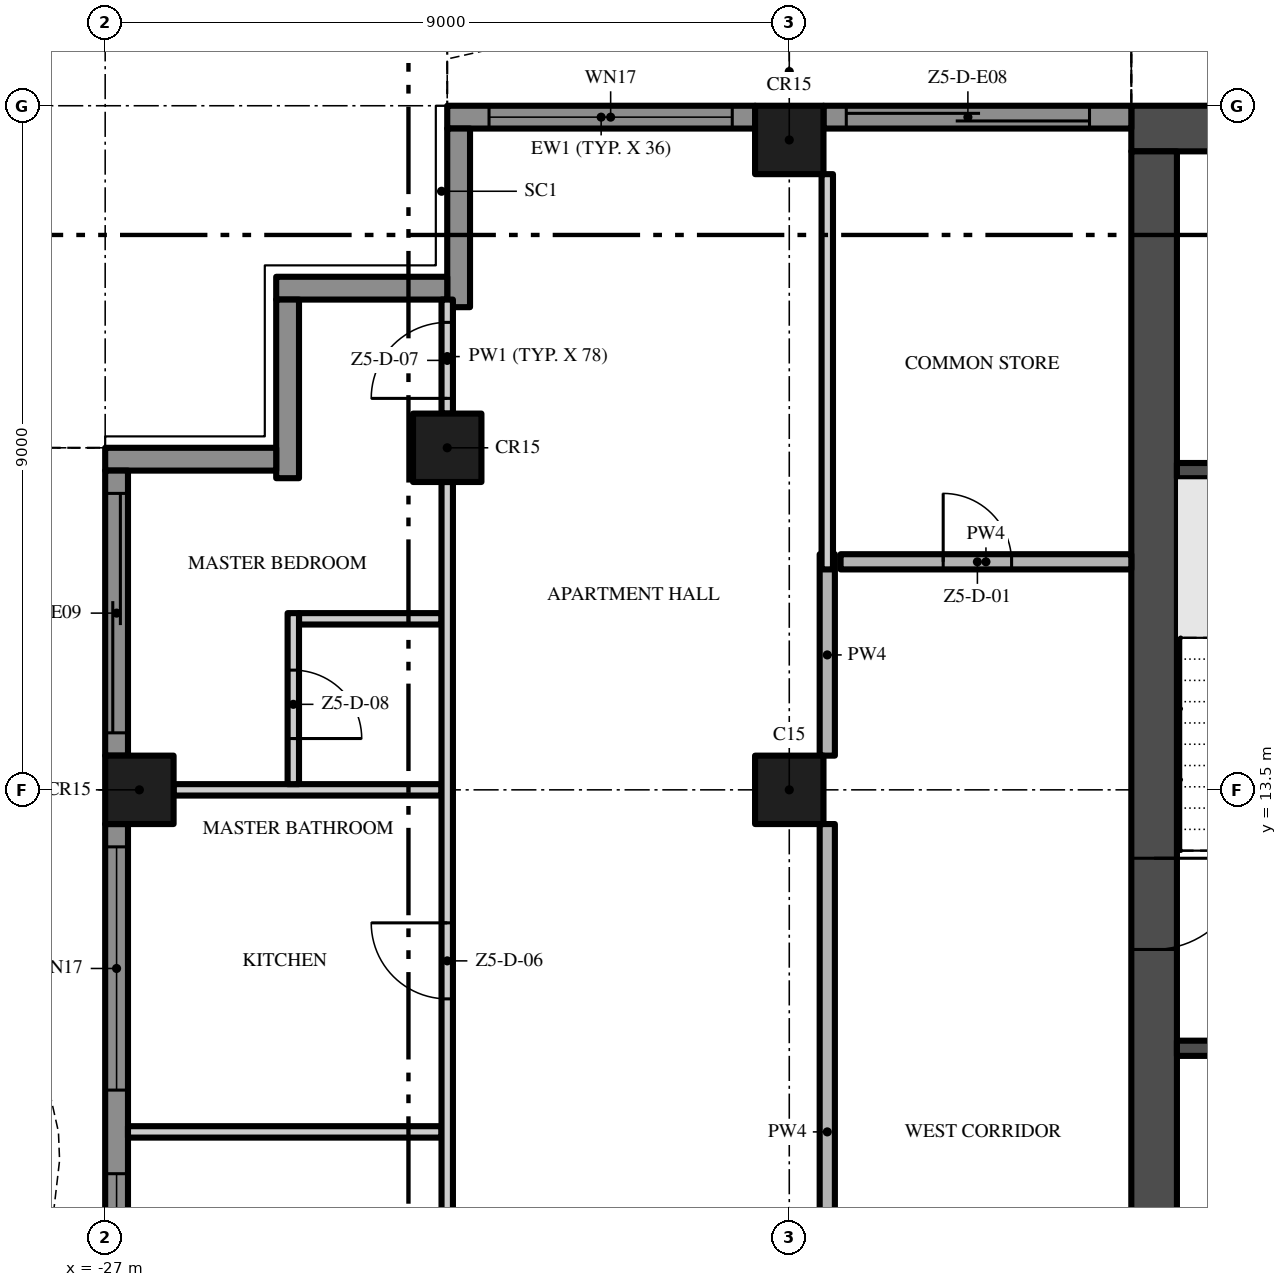
"""IFC4 building model, lengths in metres.
Left out: names, types, materials, properties, quantities, classifications, styles, units other than length and angle.
Written with IfcOpenShell. Run it as: python <this file> out.ifc"""

import sys

from ifc_helpers import new_model, si_unit, direction, frame, frame_2d, origin, origin_2d, place, context, subcontext, project, spatial, polyline, rectangle, outline, extrude, element, fill, save


model = new_model("IFC4")
c1 = context("Model", 3, precision=1e-05, world=origin(), true_north=direction((0.0, 1.0)))
c2 = subcontext(c1, "Body", "Model", "MODEL_VIEW")
j1 = project(units=[si_unit("LENGTHUNIT", "METRE"), si_unit("PLANEANGLEUNIT", "RADIAN")], contexts=[c1])
p1 = place(None, origin())
s1 = spatial("IfcSite", under=j1, at=p1, CompositionType="ELEMENT")
p2 = place(p1, origin())
s2 = spatial("IfcBuilding", under=s1, at=p2, CompositionType="ELEMENT")
p3 = place(p2, frame((0.0, 0.0, 276.8)))
s3 = spatial("IfcBuildingStorey", under=s2, at=p3, CompositionType="ELEMENT", Elevation=276.8)
p4 = place(p3, frame((13.5, 22.2, -0.3), z_axis=(0.0, 0.0, 1.0), x_axis=(-1.0, 0.0, 0.0)))
e1 = element("IfcWall", 1, at=p4, inside=s3, PredefinedType="SHEAR", context=c2, shape_type="SweptSolid", body=[
    extrude(rectangle(XDim=27.0, YDim=0.6, at=frame_2d((13.5, 0.0))), origin(), (0.0, 0.0, 1.0), 3.8),
])
p5 = place(p3, frame((-13.2, 21.9, -0.3), z_axis=(0.0, 0.0, 1.0), x_axis=(0.0, -1.0, 0.0)))
e2 = element("IfcWall", 2, at=p5, inside=s3, PredefinedType="SHEAR", context=c2, shape_type="SweptSolid", body=[
    extrude(rectangle(XDim=16.8, YDim=0.6, at=frame_2d((8.4, 0.0))), origin(), (0.0, 0.0, 1.0), 3.8),
])
p6 = place(p5, frame((9.3, 0.0, 0.3)))
e3 = element("IfcOpeningElement", 3, at=p6, cuts=e2, PredefinedType="OPENING", context=c2, shape_type="SweptSolid", body=[
    extrude(rectangle(XDim=1.2, YDim=2.2, at=frame_2d((0.6, 1.1))), frame((0.0, 0.31, 0.0), z_axis=(0.0, -1.0, 0.0), x_axis=(1.0, 0.0, 0.0)), (0.0, 0.0, 1.0), 0.62),
])
for number, where, z_axis, x_axis in (
    (4, (-18.0, 13.5, 0.0), (0.0, 0.0, 1.0), (1.0, 0.0, 0.0)),
    (5, (-18.0, 22.05, 0.0), (0.0, 0.0, 1.0), (1.0, 0.0, 0.0)),
    (6, (-26.55, 13.5, 0.0), (0.0, 0.0, 1.0), (1.0, 0.0, 0.0)),
    (7, (-22.5, 18.0, 0.0), (0.0, 0.0, 1.0), (1.0, 0.0, 0.0)),
):
    element("IfcColumn", number, at=place(p3, frame(where, z_axis=z_axis, x_axis=x_axis)), inside=s3, PredefinedType="COLUMN", context=c2, shape_type="SweptSolid", body=[
        extrude(rectangle(XDim=0.9, YDim=0.9, at=origin_2d()), origin(), (0.0, 0.0, 1.0), 3.5),
    ])
p7 = place(p3, frame((-17.55, 22.35, 0.0), z_axis=(0.0, 0.0, 1.0), x_axis=(1.0, 0.0, 0.0)))
e8 = element("IfcWall", 8, at=p7, inside=s3, PredefinedType="SOLIDWALL", context=c2, shape_type="SweptSolid", body=[
    extrude(rectangle(XDim=4.05, YDim=0.3, at=frame_2d((2.025, 0.0))), origin(), (0.0, 0.0, 1.0), 3.5),
])
p8 = place(p7, frame((0.3, 0.0, 0.0)))
e9 = element("IfcOpeningElement", 9, at=p8, cuts=e8, PredefinedType="OPENING", context=c2, shape_type="SweptSolid", body=[
    extrude(rectangle(XDim=3.2, YDim=2.4, at=frame_2d((1.6, 1.2))), frame((0.0, 0.16, 0.0), z_axis=(0.0, -1.0, 0.0), x_axis=(1.0, 0.0, 0.0)), (0.0, 0.0, 1.0), 0.32),
])
p9 = place(p3, frame((-22.5, 22.35, 0.0), z_axis=(0.0, 0.0, 1.0), x_axis=(1.0, 0.0, 0.0)))
e10 = element("IfcWall", 10, at=p9, inside=s3, PredefinedType="SOLIDWALL", context=c2, shape_type="SweptSolid", body=[
    extrude(rectangle(XDim=4.05, YDim=0.3, at=frame_2d((2.025, 0.0))), origin(), (0.0, 0.0, 1.0), 3.5),
])
p10 = place(p9, frame((0.55, 0.0, 0.45)))
e11 = element("IfcOpeningElement", 11, at=p10, cuts=e10, PredefinedType="OPENING", context=c2, shape_type="SweptSolid", body=[
    extrude(rectangle(XDim=3.2, YDim=2.65, at=frame_2d((1.6, 1.325))), frame((0.0, 0.16, 0.0), z_axis=(0.0, -1.0, 0.0), x_axis=(1.0, 0.0, 0.0)), (0.0, 0.0, 1.0), 0.32),
])
p11 = place(p3, frame((-22.35, 19.85, 0.0), z_axis=(0.0, 0.0, 1.0), x_axis=(0.0, 1.0, 0.0)))
e12 = element("IfcWall", 12, at=p11, inside=s3, PredefinedType="SOLIDWALL", context=c2, shape_type="SweptSolid", body=[
    extrude(rectangle(XDim=2.35, YDim=0.3, at=frame_2d((1.175, 0.0))), origin(), (0.0, 0.0, 1.0), 3.5),
])
p12 = place(p3, frame((-24.75, 20.1, 0.0), z_axis=(0.0, 0.0, 1.0), x_axis=(1.0, 0.0, 0.0)))
e13 = element("IfcWall", 13, at=p12, inside=s3, PredefinedType="SOLIDWALL", context=c2, shape_type="SweptSolid", body=[
    extrude(rectangle(XDim=2.25, YDim=0.3, at=frame_2d((1.125, 0.0))), origin(), (0.0, 0.0, 1.0), 3.5),
])
p13 = place(p3, frame((-24.6, 17.6, 0.0), z_axis=(0.0, 0.0, 1.0), x_axis=(0.0, 1.0, 0.0)))
e14 = element("IfcWall", 14, at=p13, inside=s3, PredefinedType="SOLIDWALL", context=c2, shape_type="SweptSolid", body=[
    extrude(rectangle(XDim=2.35, YDim=0.3, at=frame_2d((1.175, 0.0))), origin(), (0.0, 0.0, 1.0), 3.5),
])
p14 = place(p3, frame((-27.0, 17.85, 0.0), z_axis=(0.0, 0.0, 1.0), x_axis=(1.0, 0.0, 0.0)))
e15 = element("IfcWall", 15, at=p14, inside=s3, PredefinedType="SOLIDWALL", context=c2, shape_type="SweptSolid", body=[
    extrude(rectangle(XDim=2.25, YDim=0.3, at=frame_2d((1.125, 0.0))), origin(), (0.0, 0.0, 1.0), 3.5),
])
p15 = place(p3, frame((-26.85, 13.95, 0.0), z_axis=(0.0, 0.0, 1.0), x_axis=(0.0, 1.0, 0.0)))
e16 = element("IfcWall", 16, at=p15, inside=s3, PredefinedType="SOLIDWALL", context=c2, shape_type="SweptSolid", body=[
    extrude(rectangle(XDim=3.75, YDim=0.3, at=frame_2d((1.875, 0.0))), origin(), (0.0, 0.0, 1.0), 3.5),
])
p16 = place(p15, frame((0.3, 0.0, 0.0)))
e17 = element("IfcOpeningElement", 17, at=p16, cuts=e16, PredefinedType="OPENING", context=c2, shape_type="SweptSolid", body=[
    extrude(rectangle(XDim=3.15, YDim=2.4, at=frame_2d((1.575, 1.2))), frame((0.0, 0.16, 0.0), z_axis=(0.0, -1.0, 0.0), x_axis=(1.0, 0.0, 0.0)), (0.0, 0.0, 1.0), 0.32),
])
p17 = place(p3, frame((-26.85, 4.95, 0.0), z_axis=(0.0, 0.0, 1.0), x_axis=(0.0, 1.0, 0.0)))
e18 = element("IfcWall", 18, at=p17, inside=s3, PredefinedType="SOLIDWALL", context=c2, shape_type="SweptSolid", body=[
    extrude(rectangle(XDim=8.1, YDim=0.3, at=frame_2d((4.05, 0.0))), origin(), (0.0, 0.0, 1.0), 3.5),
])
p18 = place(p17, frame((4.6, 0.0, 0.45)))
e19 = element("IfcOpeningElement", 19, at=p18, cuts=e18, PredefinedType="OPENING", context=c2, shape_type="SweptSolid", body=[
    extrude(rectangle(XDim=3.2, YDim=2.65, at=frame_2d((1.6, 1.325))), frame((0.0, 0.16, 0.0), z_axis=(0.0, -1.0, 0.0), x_axis=(1.0, 0.0, 0.0)), (0.0, 0.0, 1.0), 0.32),
])
p19 = place(p17, frame((0.3, 0.0, 0.45)))
e20 = element("IfcOpeningElement", 20, at=p19, cuts=e18, PredefinedType="OPENING", context=c2, shape_type="SweptSolid", body=[
    extrude(rectangle(XDim=3.2, YDim=2.65, at=frame_2d((1.6, 1.325))), frame((0.0, 0.16, 0.0), z_axis=(0.0, -1.0, 0.0), x_axis=(1.0, 0.0, 0.0)), (0.0, 0.0, 1.0), 0.32),
])
p20 = place(p3, origin())
e21 = element("IfcWall", 21, at=p20, inside=s3, PredefinedType="USERDEFINED", context=c2, shape_type="SweptSolid", body=[
    extrude(outline(polyline([(-13.5, 25.149), (-15.0, 25.485), (-15.375, 25.5), (-16.5, 25.369), (-18.0, 24.845), (-19.5, 24.112), (-21.0, 23.451), (-22.5, 23.115), (-22.445, 22.871), (-20.921, 23.213), (-19.395, 23.885), (-17.904, 24.614), (-16.444, 25.124), (-15.365, 25.249), (-15.033, 25.236), (-13.555, 24.905), (-13.5, 25.149)])), origin(), (0.0, 0.0, 1.0), 0.9),
])
p21 = place(p3, origin())
e22 = element("IfcWall", 22, at=p21, inside=s3, PredefinedType="USERDEFINED", context=c2, shape_type="SweptSolid", body=[
    extrude(outline(polyline([(-29.649, 18.0), (-29.985, 16.5), (-30.0, 16.125), (-29.869, 15.0), (-29.345, 13.5), (-28.612, 12.0), (-27.951, 10.5), (-27.615, 9.0), (-27.6, 8.625), (-27.731, 7.5), (-28.255, 6.0), (-28.988, 4.5), (-29.649, 3.0), (-29.985, 1.5), (-30.0, 1.125), (-29.869, 0.0), (-29.345, -1.5), (-28.612, -3.0), (-27.951, -4.5), (-27.615, -6.0), (-27.6, -6.375), (-27.731, -7.5), (-28.255, -9.0), (-28.988, -10.5), (-29.649, -12.0), (-29.985, -13.5), (-30.0, -13.875), (-29.869, -15.0), (-29.345, -16.5), (-28.612, -18.0), (-28.388, -17.89), (-29.114, -16.404), (-29.624, -14.944), (-29.749, -13.865), (-29.736, -13.533), (-29.41, -12.079), (-28.761, -10.605), (-28.024, -9.096), (-27.486, -7.556), (-27.349, -6.385), (-27.366, -5.967), (-27.713, -4.421), (-28.385, -2.895), (-29.114, -1.404), (-29.624, 0.056), (-29.749, 1.135), (-29.736, 1.467), (-29.41, 2.921), (-28.761, 4.395), (-28.024, 5.904), (-27.486, 7.444), (-27.349, 8.615), (-27.366, 9.033), (-27.713, 10.579), (-28.385, 12.105), (-29.114, 13.596), (-29.624, 15.056), (-29.749, 16.135), (-29.736, 16.467), (-29.405, 17.945), (-29.649, 18.0)])), origin(), (0.0, 0.0, 1.0), 0.9),
])
for number, where, z_axis, x_axis in (
    (23, (-12.9, 10.1, 0.0), (0.0, 0.0, 1.0), (1.0, 0.0, 0.0)),
    (24, (-12.9, 17.7, 0.0), (0.0, 0.0, 1.0), (1.0, 0.0, 0.0)),
):
    element("IfcWall", number, at=place(p3, frame(where, z_axis=z_axis, x_axis=x_axis)), inside=s3, PredefinedType="SHEAR", context=c2, shape_type="SweptSolid", body=[
        extrude(rectangle(XDim=3.25, YDim=0.2, at=frame_2d((1.625, 0.0))), origin(), (0.0, 0.0, 1.0), 3.5),
    ])
p22 = place(p3, frame((-26.7, 9.0, 0.0), z_axis=(0.0, 0.0, 1.0), x_axis=(1.0, 0.0, 0.0)))
e25 = element("IfcWall", 25, at=p22, inside=s3, PredefinedType="PARTITIONING", context=c2, shape_type="SweptSolid", body=[
    extrude(rectangle(XDim=4.125, YDim=0.15, at=frame_2d((2.062, 0.0))), origin(), (0.0, 0.0, 1.0), 3.5),
])
p23 = place(p3, frame((-26.1, 13.5, 0.0), z_axis=(0.0, 0.0, 1.0), x_axis=(1.0, 0.0, 0.0)))
e26 = element("IfcWall", 26, at=p23, inside=s3, PredefinedType="PARTITIONING", context=c2, shape_type="SweptSolid", body=[
    extrude(rectangle(XDim=3.525, YDim=0.15, at=frame_2d((1.762, 0.0))), origin(), (0.0, 0.0, 1.0), 3.5),
])
p24 = place(p3, frame((-24.45, 15.75, 0.0), z_axis=(0.0, 0.0, 1.0), x_axis=(1.0, 0.0, 0.0)))
e27 = element("IfcWall", 27, at=p24, inside=s3, PredefinedType="PARTITIONING", context=c2, shape_type="SweptSolid", body=[
    extrude(rectangle(XDim=1.875, YDim=0.15, at=frame_2d((0.938, 0.0))), origin(), (0.0, 0.0, 1.0), 3.5),
])
p25 = place(p3, frame((-17.325, 16.5, 0.0), z_axis=(0.0, 0.0, 1.0), x_axis=(1.0, 0.0, 0.0)))
e28 = element("IfcWall", 28, at=p25, inside=s3, PredefinedType="PARTITIONING", context=c2, shape_type="SweptSolid", body=[
    extrude(rectangle(XDim=3.825, YDim=0.2, at=frame_2d((1.913, 0.0))), origin(), (0.0, 0.0, 1.0), 3.5),
])
p26 = place(p25, frame((1.35, 0.0, 0.0)))
e29 = element("IfcOpeningElement", 29, at=p26, cuts=e28, PredefinedType="OPENING", context=c2, shape_type="SweptSolid", body=[
    extrude(rectangle(XDim=0.9, YDim=2.1, at=frame_2d((0.45, 1.05))), frame((0.0, 0.11, 0.0), z_axis=(0.0, -1.0, 0.0), x_axis=(1.0, 0.0, 0.0)), (0.0, 0.0, 1.0), 0.22),
])
p27 = place(p3, frame((-24.525, 15.825, 0.0), z_axis=(0.0, 0.0, 1.0), x_axis=(0.0, -1.0, 0.0)))
e30 = element("IfcWall", 30, at=p27, inside=s3, PredefinedType="PARTITIONING", context=c2, shape_type="SweptSolid", body=[
    extrude(rectangle(XDim=2.25, YDim=0.15, at=frame_2d((1.125, 0.0))), origin(), (0.0, 0.0, 1.0), 3.5),
])
p28 = place(p27, frame((0.75, 0.0, 0.0)))
e31 = element("IfcOpeningElement", 31, at=p28, cuts=e30, PredefinedType="OPENING", context=c2, shape_type="SweptSolid", body=[
    extrude(rectangle(XDim=0.9, YDim=2.1, at=frame_2d((0.45, 1.05))), frame((0.0, 0.085, 0.0), z_axis=(0.0, -1.0, 0.0), x_axis=(1.0, 0.0, 0.0)), (0.0, 0.0, 1.0), 0.17),
])
p29 = place(p3, frame((-22.5, 0.1, 0.0), z_axis=(0.0, 0.0, 1.0), x_axis=(0.0, 1.0, 0.0)))
e32 = element("IfcWall", 32, at=p29, inside=s3, PredefinedType="PARTITIONING", context=c2, shape_type="SweptSolid", body=[
    extrude(rectangle(XDim=17.45, YDim=0.15, at=frame_2d((8.725, 0.0))), origin(), (0.0, 0.0, 1.0), 3.5),
])
p30 = place(p29, frame((2.4, 0.0, 0.0)))
e33 = element("IfcOpeningElement", 33, at=p30, cuts=e32, PredefinedType="OPENING", context=c2, shape_type="SweptSolid", body=[
    extrude(rectangle(XDim=1.8, YDim=2.4, at=frame_2d((0.9, 1.2))), frame((0.0, 0.085, 0.0), z_axis=(0.0, -1.0, 0.0), x_axis=(1.0, 0.0, 0.0)), (0.0, 0.0, 1.0), 0.17),
])
p31 = place(p29, frame((10.65, 0.0, 0.0)))
e34 = element("IfcOpeningElement", 34, at=p31, cuts=e32, PredefinedType="OPENING", context=c2, shape_type="SweptSolid", body=[
    extrude(rectangle(XDim=1.0, YDim=2.4, at=frame_2d((0.5, 1.2))), frame((0.0, 0.085, 0.0), z_axis=(0.0, -1.0, 0.0), x_axis=(1.0, 0.0, 0.0)), (0.0, 0.0, 1.0), 0.17),
])
p32 = place(p3, frame((-22.5, 18.45, 0.0), z_axis=(0.0, 0.0, 1.0), x_axis=(0.0, 1.0, 0.0)))
e35 = element("IfcWall", 35, at=p32, inside=s3, PredefinedType="PARTITIONING", context=c2, shape_type="SweptSolid", body=[
    extrude(rectangle(XDim=1.5, YDim=0.15, at=frame_2d((0.75, 0.0))), origin(), (0.0, 0.0, 1.0), 3.5),
])
p33 = place(p32, frame((0.2, 0.0, 0.0)))
e36 = element("IfcOpeningElement", 36, at=p33, cuts=e35, PredefinedType="OPENING", context=c2, shape_type="SweptSolid", body=[
    extrude(rectangle(XDim=1.0, YDim=2.4, at=frame_2d((0.5, 1.2))), frame((0.0, 0.085, 0.0), z_axis=(0.0, -1.0, 0.0), x_axis=(1.0, 0.0, 0.0)), (0.0, 0.0, 1.0), 0.17),
])
p34 = place(p3, frame((-17.5, 4.95, 0.0), z_axis=(0.0, 0.0, 1.0), x_axis=(0.0, 1.0, 0.0)))
e37 = element("IfcWall", 37, at=p34, inside=s3, PredefinedType="PARTITIONING", context=c2, shape_type="SweptSolid", body=[
    extrude(rectangle(XDim=8.1, YDim=0.2, at=frame_2d((4.05, 0.0))), origin(), (0.0, 0.0, 1.0), 3.5),
])
p35 = place(p34, frame((1.2, 0.0, 0.0)))
e38 = element("IfcOpeningElement", 38, at=p35, cuts=e37, PredefinedType="OPENING", context=c2, shape_type="SweptSolid", body=[
    extrude(rectangle(XDim=1.2, YDim=2.4, at=frame_2d((0.6, 1.2))), frame((0.0, 0.11, 0.0), z_axis=(0.0, -1.0, 0.0), x_axis=(1.0, 0.0, 0.0)), (0.0, 0.0, 1.0), 0.22),
])
p36 = place(p3, frame((-17.5, 13.95, 0.0), z_axis=(0.0, 0.0, 1.0), x_axis=(0.0, 1.0, 0.0)))
e39 = element("IfcWall", 39, at=p36, inside=s3, PredefinedType="PARTITIONING", context=c2, shape_type="SweptSolid", body=[
    extrude(rectangle(XDim=2.65, YDim=0.2, at=frame_2d((1.325, 0.0))), origin(), (0.0, 0.0, 1.0), 3.5),
])
p37 = place(p3, frame((-17.5, 16.4, 0.0), z_axis=(0.0, 0.0, 1.0), x_axis=(0.0, 1.0, 0.0)))
e40 = element("IfcWall", 40, at=p37, inside=s3, PredefinedType="PARTITIONING", context=c2, shape_type="SweptSolid", body=[
    extrude(rectangle(XDim=5.2, YDim=0.15, at=frame_2d((2.6, 0.0))), origin(), (0.0, 0.0, 1.0), 3.5),
])
p38 = place(p8, origin())
e41 = element("IfcDoor", 41, at=p38, inside=s3, OperationType="SINGLE_SWING_LEFT", PredefinedType="DOOR", context=c2, shape_type="SweptSolid", body=[
    extrude(rectangle(XDim=3.2, YDim=2.4, at=frame_2d((1.6, 1.2))), frame((0.0, 0.025, 0.0), z_axis=(0.0, -1.0, 0.0), x_axis=(1.0, 0.0, 0.0)), (0.0, 0.0, 1.0), 0.05),
])
fill(e9, e41)
p39 = place(p10, origin())
e42 = element("IfcWindow", 42, at=p39, inside=s3, PartitioningType="SINGLE_PANEL", PredefinedType="WINDOW", context=c2, shape_type="SweptSolid", body=[
    extrude(rectangle(XDim=3.2, YDim=2.65, at=frame_2d((1.6, 1.325))), frame((0.0, 0.03, 0.0), z_axis=(0.0, -1.0, 0.0), x_axis=(1.0, 0.0, 0.0)), (0.0, 0.0, 1.0), 0.06),
])
fill(e11, e42)
p40 = place(p16, origin())
e43 = element("IfcDoor", 43, at=p40, inside=s3, OperationType="SINGLE_SWING_LEFT", PredefinedType="DOOR", context=c2, shape_type="SweptSolid", body=[
    extrude(rectangle(XDim=3.15, YDim=2.4, at=frame_2d((1.575, 1.2))), frame((0.0, 0.025, 0.0), z_axis=(0.0, -1.0, 0.0), x_axis=(1.0, 0.0, 0.0)), (0.0, 0.0, 1.0), 0.05),
])
fill(e17, e43)
p41 = place(p18, origin())
e44 = element("IfcWindow", 44, at=p41, inside=s3, PartitioningType="SINGLE_PANEL", PredefinedType="WINDOW", context=c2, shape_type="SweptSolid", body=[
    extrude(rectangle(XDim=3.2, YDim=2.65, at=frame_2d((1.6, 1.325))), frame((0.0, 0.03, 0.0), z_axis=(0.0, -1.0, 0.0), x_axis=(1.0, 0.0, 0.0)), (0.0, 0.0, 1.0), 0.06),
])
fill(e19, e44)
p42 = place(p19, origin())
e45 = element("IfcWindow", 45, at=p42, inside=s3, PartitioningType="SINGLE_PANEL", PredefinedType="WINDOW", context=c2, shape_type="SweptSolid", body=[
    extrude(rectangle(XDim=3.2, YDim=2.65, at=frame_2d((1.6, 1.325))), frame((0.0, 0.03, 0.0), z_axis=(0.0, -1.0, 0.0), x_axis=(1.0, 0.0, 0.0)), (0.0, 0.0, 1.0), 0.06),
])
fill(e20, e45)
p43 = place(p6, frame((1.2, 0.0, 0.0), z_axis=(0.0, 0.0, 1.0), x_axis=(-1.0, 0.0, 0.0)))
e46 = element("IfcDoor", 46, at=p43, inside=s3, OperationType="SINGLE_SWING_RIGHT", PredefinedType="DOOR", context=c2, shape_type="SweptSolid", body=[
    extrude(rectangle(XDim=1.2, YDim=2.2, at=frame_2d((0.6, 1.1))), frame((0.0, 0.025, 0.0), z_axis=(0.0, -1.0, 0.0), x_axis=(1.0, 0.0, 0.0)), (0.0, 0.0, 1.0), 0.05),
])
fill(e3, e46)
p44 = place(p26, origin())
e47 = element("IfcDoor", 47, at=p44, inside=s3, OperationType="SINGLE_SWING_LEFT", PredefinedType="DOOR", context=c2, shape_type="SweptSolid", body=[
    extrude(rectangle(XDim=0.9, YDim=2.1, at=frame_2d((0.45, 1.05))), frame((0.0, 0.025, 0.0), z_axis=(0.0, -1.0, 0.0), x_axis=(1.0, 0.0, 0.0)), (0.0, 0.0, 1.0), 0.05),
])
fill(e29, e47)
p45 = place(p31, origin())
e48 = element("IfcDoor", 48, at=p45, inside=s3, OperationType="SINGLE_SWING_RIGHT", PredefinedType="DOOR", context=c2, shape_type="SweptSolid", body=[
    extrude(rectangle(XDim=1.0, YDim=2.4, at=frame_2d((0.5, 1.2))), frame((0.0, 0.025, 0.0), z_axis=(0.0, -1.0, 0.0), x_axis=(1.0, 0.0, 0.0)), (0.0, 0.0, 1.0), 0.05),
])
fill(e34, e48)
p46 = place(p33, origin())
e49 = element("IfcDoor", 49, at=p46, inside=s3, OperationType="SINGLE_SWING_LEFT", PredefinedType="DOOR", context=c2, shape_type="SweptSolid", body=[
    extrude(rectangle(XDim=1.0, YDim=2.4, at=frame_2d((0.5, 1.2))), frame((0.0, 0.025, 0.0), z_axis=(0.0, -1.0, 0.0), x_axis=(1.0, 0.0, 0.0)), (0.0, 0.0, 1.0), 0.05),
])
fill(e36, e49)
p47 = place(p28, origin())
e50 = element("IfcDoor", 50, at=p47, inside=s3, OperationType="SINGLE_SWING_RIGHT", PredefinedType="DOOR", context=c2, shape_type="SweptSolid", body=[
    extrude(rectangle(XDim=0.9, YDim=2.1, at=frame_2d((0.45, 1.05))), frame((0.0, 0.025, 0.0), z_axis=(0.0, -1.0, 0.0), x_axis=(1.0, 0.0, 0.0)), (0.0, 0.0, 1.0), 0.05),
])
fill(e31, e50)
save(model, sys.argv[1])
